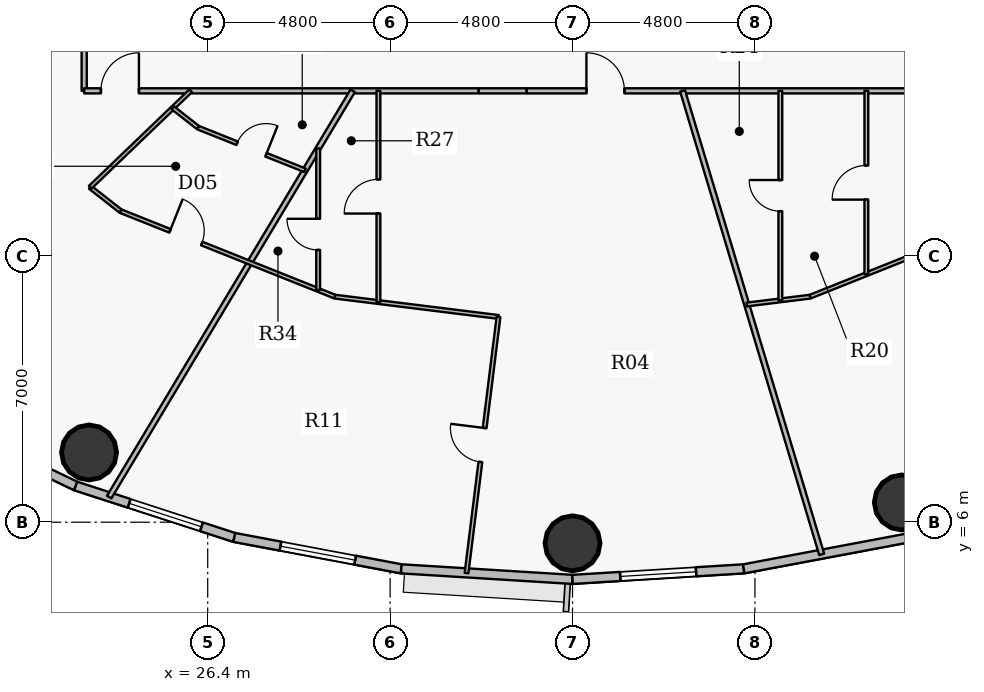
"""IFC4 building model, lengths in metres.
Left out: names, types, materials, properties, quantities, classifications, styles, units other than length and angle.
Written with IfcOpenShell. Run it as: python <this file> out.ifc"""

import sys

from ifc_helpers import new_model, si_unit, direction, frame, frame_2d, origin, origin_2d, place, context, subcontext, project, spatial, rectangle, hollow_circle, extrude, source, transform, mapped, element, fill, save


model = new_model("IFC4")
c1 = context("Model", 3, precision=1e-05, world=origin(), true_north=direction((0.0, 1.0)))
c2 = subcontext(c1, "Body", "Model", "MODEL_VIEW")
j1 = project(units=[si_unit("LENGTHUNIT", "METRE"), si_unit("PLANEANGLEUNIT", "RADIAN")], contexts=[c1])
p1 = place(None, origin())
s1 = spatial("IfcSite", under=j1, at=p1, CompositionType="ELEMENT")
p2 = place(p1, origin())
s2 = spatial("IfcBuilding", under=s1, at=p2, CompositionType="ELEMENT")
p3 = place(p2, frame((0.0, 0.0, 100.95)))
s3 = spatial("IfcBuildingStorey", under=s2, at=p3, CompositionType="ELEMENT", Elevation=100.95)
for number, where, z_axis, x_axis in (
    (1, (23.278, 7.835, 0.0), (0.0, 0.0, 1.0), (1.0, 0.0, 0.0)),
    (2, (36.0, 5.445, 0.0), (0.0, 0.0, 1.0), (1.0, 0.0, 0.0)),
    (3, (44.666, 6.519, 0.0), (0.0, 0.0, 1.0), (1.0, 0.0, 0.0)),
):
    element("IfcColumn", number, at=place(p3, frame(where, z_axis=z_axis, x_axis=x_axis)), inside=s3, PredefinedType="COLUMN", context=c2, shape_type="SweptSolid", body=[
        extrude(hollow_circle(Radius=0.725, WallThickness=0.042, at=origin_2d()), origin(), (0.0, 0.0, 1.0), 3.75),
    ])
p4 = place(p3, frame((22.926, 6.953, 0.0), z_axis=(0.0, 0.0, 1.0), x_axis=(-0.901589935876, 0.432591709962, 0.0)))
e4 = element("IfcWall", 4, at=p4, inside=s3, PredefinedType="SOLIDWALL", context=c2, shape_type="SweptSolid", body=[
    extrude(rectangle(XDim=4.272, YDim=0.24, at=frame_2d((2.136, 0.0))), origin(), (0.0, 0.0, 1.0), 3.5),
])
p5 = place(p4, frame((1.136, 0.0, 0.9)))
e5 = element("IfcOpeningElement", 5, at=p5, cuts=e4, PredefinedType="OPENING", context=c2, shape_type="SweptSolid", body=[
    extrude(rectangle(XDim=2.0, YDim=1.75, at=origin_2d()), frame((1.0, 0.13, 0.875), z_axis=(0.0, -1.0, 0.0), x_axis=(1.0, 0.0, 0.0)), (0.0, 0.0, 1.0), 0.26),
])
p6 = place(p3, frame((27.1, 5.599, 0.0), z_axis=(0.0, 0.0, 1.0), x_axis=(-0.951211346073, 0.308540070495, 0.0)))
e6 = element("IfcWall", 6, at=p6, inside=s3, PredefinedType="SOLIDWALL", context=c2, shape_type="SweptSolid", body=[
    extrude(rectangle(XDim=4.388, YDim=0.24, at=frame_2d((2.194, 0.0))), origin(), (0.0, 0.0, 1.0), 3.5),
])
p7 = place(p6, frame((0.909, 0.0, 0.9)))
e7 = element("IfcOpeningElement", 7, at=p7, cuts=e6, PredefinedType="OPENING", context=c2, shape_type="SweptSolid", body=[
    extrude(rectangle(XDim=2.0, YDim=1.75, at=origin_2d()), frame((1.0, 0.13, 0.875), z_axis=(0.0, -1.0, 0.0), x_axis=(1.0, 0.0, 0.0)), (0.0, 0.0, 1.0), 0.26),
])
p8 = place(p3, frame((31.494, 4.773, 0.0), z_axis=(0.0, 0.0, 1.0), x_axis=(-0.982789252177, 0.184730305596, 0.0)))
e8 = element("IfcWall", 8, at=p8, inside=s3, PredefinedType="SOLIDWALL", context=c2, shape_type="SweptSolid", body=[
    extrude(rectangle(XDim=4.471, YDim=0.24, at=frame_2d((2.235, 0.0))), origin(), (0.0, 0.0, 1.0), 3.5),
])
p9 = place(p8, frame((1.236, 0.0, 0.9)))
e9 = element("IfcOpeningElement", 9, at=p9, cuts=e8, PredefinedType="OPENING", context=c2, shape_type="SweptSolid", body=[
    extrude(rectangle(XDim=2.0, YDim=1.75, at=origin_2d()), frame((1.0, 0.13, 0.875), z_axis=(0.0, -1.0, 0.0), x_axis=(1.0, 0.0, 0.0)), (0.0, 0.0, 1.0), 0.26),
])
p10 = place(p3, frame((36.0, 4.495, 0.0), z_axis=(0.0, 0.0, 1.0), x_axis=(-0.998107531589, 0.061492726276, 0.0)))
e10 = element("IfcWall", 10, at=p10, inside=s3, PredefinedType="SOLIDWALL", context=c2, shape_type="SweptSolid", body=[
    extrude(rectangle(XDim=4.514, YDim=0.24, at=frame_2d((2.257, 0.0))), origin(), (0.0, 0.0, 1.0), 3.5),
])
p11 = place(p3, frame((40.506, 4.773, 0.0), z_axis=(0.0, 0.0, 1.0), x_axis=(-0.998107531589, -0.061492726276, 0.0)))
e11 = element("IfcWall", 11, at=p11, inside=s3, PredefinedType="SOLIDWALL", context=c2, shape_type="SweptSolid", body=[
    extrude(rectangle(XDim=4.514, YDim=0.24, at=frame_2d((2.257, 0.0))), origin(), (0.0, 0.0, 1.0), 3.5),
])
p12 = place(p11, frame((1.257, 0.0, 0.9)))
e12 = element("IfcOpeningElement", 12, at=p12, cuts=e11, PredefinedType="OPENING", context=c2, shape_type="SweptSolid", body=[
    extrude(rectangle(XDim=2.0, YDim=1.75, at=origin_2d()), frame((1.0, 0.13, 0.875), z_axis=(0.0, -1.0, 0.0), x_axis=(1.0, 0.0, 0.0)), (0.0, 0.0, 1.0), 0.26),
])
p13 = place(p3, frame((44.9, 5.599, 0.0), z_axis=(0.0, 0.0, 1.0), x_axis=(-0.982789252177, -0.184730305596, 0.0)))
e13 = element("IfcWall", 13, at=p13, inside=s3, PredefinedType="SOLIDWALL", context=c2, shape_type="SweptSolid", body=[
    extrude(rectangle(XDim=4.471, YDim=0.24, at=frame_2d((2.235, 0.0))), origin(), (0.0, 0.0, 1.0), 3.5),
])
p14 = place(p3, frame((12.427, 14.138, 0.0), z_axis=(0.0, 0.0, 1.0), x_axis=(0.877835987922, 0.47896135367, 0.0)))
e14 = element("IfcWall", 14, at=p14, inside=s3, PredefinedType="PARTITIONING", context=c2, shape_type="SweptSolid", body=[
    extrude(rectangle(XDim=12.215, YDim=0.135, at=frame_2d((6.107, 0.0))), origin(), (0.0, 0.0, 1.0), 2.935),
])
p15 = place(p3, frame((23.15, 17.35, 0.0), z_axis=(0.0, 0.0, 1.0), x_axis=(0.0, 1.0, 0.0)))
e15 = element("IfcWall", 15, at=p15, inside=s3, PredefinedType="PARTITIONING", context=c2, shape_type="SweptSolid", body=[
    extrude(rectangle(XDim=19.3, YDim=0.135, at=frame_2d((9.65, 0.0))), origin(), (0.0, 0.0, 1.0), 2.935),
])
p16 = place(p15, frame((7.86, 0.0, 0.0)))
e16 = element("IfcOpeningElement", 16, at=p16, cuts=e15, PredefinedType="OPENING", context=c2, shape_type="SweptSolid", body=[
    extrude(rectangle(XDim=1.0, YDim=2.15, at=origin_2d()), frame((0.5, 0.078, 1.075), z_axis=(0.0, -1.0, 0.0), x_axis=(1.0, 0.0, 0.0)), (0.0, 0.0, 1.0), 0.155),
])
p17 = place(p3, frame((23.15, 17.35, 0.0), z_axis=(0.0, 0.0, 1.0), x_axis=(1.0, 0.0, 0.0)))
e17 = element("IfcWall", 17, at=p17, inside=s3, PredefinedType="PARTITIONING", context=c2, shape_type="SweptSolid", body=[
    extrude(rectangle(XDim=10.373, YDim=0.135, at=frame_2d((5.187, 0.0))), origin(), (0.0, 0.0, 1.0), 2.935),
])
p18 = place(p17, frame((0.44, 0.0, 0.0)))
e18 = element("IfcOpeningElement", 18, at=p18, cuts=e17, PredefinedType="OPENING", context=c2, shape_type="SweptSolid", body=[
    extrude(rectangle(XDim=1.0, YDim=2.15, at=origin_2d()), frame((0.5, 0.078, 1.075), z_axis=(0.0, -1.0, 0.0), x_axis=(1.0, 0.0, 0.0)), (0.0, 0.0, 1.0), 0.155),
])
p19 = place(p3, frame((23.307, 14.812, 0.0), z_axis=(0.0, 0.0, 1.0), x_axis=(0.787398737985, -0.616444018075, 0.0)))
e19 = element("IfcWall", 19, at=p19, inside=s3, PredefinedType="PARTITIONING", context=c2, shape_type="SweptSolid", body=[
    extrude(rectangle(XDim=1.018, YDim=0.1, at=frame_2d((0.509, 0.0))), origin(), (0.0, 0.0, 1.0), 3.035),
])
p20 = place(p3, frame((23.307, 14.812, 0.0), z_axis=(0.0, 0.0, 1.0), x_axis=(0.721286127108, 0.692637223113, 0.0)))
e20 = element("IfcWall", 20, at=p20, inside=s3, PredefinedType="PARTITIONING", context=c2, shape_type="SweptSolid", body=[
    extrude(rectangle(XDim=3.664, YDim=0.1, at=frame_2d((1.832, 0.0))), origin(), (0.0, 0.0, 1.0), 3.5),
])
p21 = place(p3, frame((23.808, 6.661, 0.0), z_axis=(0.0, 0.0, 1.0), x_axis=(0.51416439954, 0.857691652195, 0.0)))
e21 = element("IfcWall", 21, at=p21, inside=s3, PredefinedType="PARTITIONING", context=c2, shape_type="SweptSolid", body=[
    extrude(rectangle(XDim=12.462, YDim=0.135, at=frame_2d((6.231, 0.0))), origin(), (0.0, 0.0, 1.0), 2.935),
])
p22 = place(p3, frame((24.109, 14.184, 0.0), z_axis=(0.0, 0.0, 1.0), x_axis=(0.9288090756, -0.370558633798, 0.0)))
e22 = element("IfcWall", 22, at=p22, inside=s3, PredefinedType="PARTITIONING", context=c2, shape_type="SweptSolid", body=[
    extrude(rectangle(XDim=6.072, YDim=0.1, at=frame_2d((3.036, 0.0))), origin(), (0.0, 0.0, 1.0), 2.935),
])
p23 = place(p22, frame((1.398, 0.0, 0.0)))
e23 = element("IfcOpeningElement", 23, at=p23, cuts=e22, PredefinedType="OPENING", context=c2, shape_type="SweptSolid", body=[
    extrude(rectangle(XDim=0.9, YDim=2.1, at=origin_2d()), frame((0.45, 0.06, 1.05), z_axis=(0.0, -1.0, 0.0), x_axis=(1.0, 0.0, 0.0)), (0.0, 0.0, 1.0), 0.12),
])
p24 = place(p3, frame((25.483, 16.901, 0.0), z_axis=(0.0, 0.0, 1.0), x_axis=(0.787321722918, -0.616542378609, 0.0)))
e24 = element("IfcWall", 24, at=p24, inside=s3, PredefinedType="PARTITIONING", context=c2, shape_type="SweptSolid", body=[
    extrude(rectangle(XDim=0.844, YDim=0.1, at=frame_2d((0.422, 0.0))), origin(), (0.0, 0.0, 1.0), 3.5),
])
p25 = place(p3, frame((26.147, 16.381, 0.0), z_axis=(0.0, 0.0, 1.0), x_axis=(0.928793125476, -0.370598610451, 0.0)))
e25 = element("IfcWall", 25, at=p25, inside=s3, PredefinedType="PARTITIONING", context=c2, shape_type="SweptSolid", body=[
    extrude(rectangle(XDim=3.03, YDim=0.1, at=frame_2d((1.515, 0.0))), origin(), (0.0, 0.0, 1.0), 2.935),
])
p26 = place(p25, frame((1.105, 0.0, 0.0)))
e26 = element("IfcOpeningElement", 26, at=p26, cuts=e25, PredefinedType="OPENING", context=c2, shape_type="SweptSolid", body=[
    extrude(rectangle(XDim=0.82, YDim=2.1, at=origin_2d()), frame((0.41, 0.06, 1.05), z_axis=(0.0, -1.0, 0.0), x_axis=(1.0, 0.0, 0.0)), (0.0, 0.0, 1.0), 0.12),
])
p27 = place(p3, frame((29.307, 12.111, 0.0), z_axis=(0.0, 0.0, 1.0), x_axis=(0.0, 1.0, 0.0)))
e27 = element("IfcWall", 27, at=p27, inside=s3, PredefinedType="PARTITIONING", context=c2, shape_type="SweptSolid", body=[
    extrude(rectangle(XDim=3.724, YDim=0.1, at=frame_2d((1.862, 0.0))), origin(), (0.0, 0.0, 1.0), 3.5),
])
p28 = place(p27, frame((1.052, 0.0, 0.0)))
e28 = element("IfcOpeningElement", 28, at=p28, cuts=e27, PredefinedType="OPENING", context=c2, shape_type="SweptSolid", body=[
    extrude(rectangle(XDim=0.82, YDim=2.1, at=origin_2d()), frame((0.41, 0.06, 1.05), z_axis=(0.0, -1.0, 0.0), x_axis=(1.0, 0.0, 0.0)), (0.0, 0.0, 1.0), 0.12),
])
p29 = place(p3, frame((29.749, 11.934, 0.0), z_axis=(0.0, 0.0, 1.0), x_axis=(0.992398657051, -0.123064639455, 0.0)))
e29 = element("IfcWall", 29, at=p29, inside=s3, PredefinedType="PARTITIONING", context=c2, shape_type="SweptSolid", body=[
    extrude(rectangle(XDim=4.337, YDim=0.1, at=frame_2d((2.168, 0.0))), origin(), (0.0, 0.0, 1.0), 3.5),
])
p30 = place(p3, frame((30.892, 11.792, 0.0), z_axis=(0.0, 0.0, 1.0), x_axis=(0.0, 1.0, 0.0)))
e30 = element("IfcWall", 30, at=p30, inside=s3, PredefinedType="PARTITIONING", context=c2, shape_type="SweptSolid", body=[
    extrude(rectangle(XDim=5.558, YDim=0.1, at=frame_2d((2.779, 0.0))), origin(), (0.0, 0.0, 1.0), 3.5),
])
p31 = place(p30, frame((2.329, 0.0, 0.0)))
e31 = element("IfcOpeningElement", 31, at=p31, cuts=e30, PredefinedType="OPENING", context=c2, shape_type="SweptSolid", body=[
    extrude(rectangle(XDim=0.9, YDim=2.1, at=origin_2d()), frame((0.45, 0.06, 1.05), z_axis=(0.0, -1.0, 0.0), x_axis=(1.0, 0.0, 0.0)), (0.0, 0.0, 1.0), 0.12),
])
p32 = place(p3, frame((33.211, 4.662, 0.0), z_axis=(0.0, 0.0, 1.0), x_axis=(0.123884295517, 0.992296670016, 0.0)))
e32 = element("IfcWall", 32, at=p32, inside=s3, PredefinedType="PARTITIONING", context=c2, shape_type="SweptSolid", body=[
    extrude(rectangle(XDim=6.791, YDim=0.1, at=frame_2d((3.396, 0.0))), origin(), (0.0, 0.0, 1.0), 2.935),
])
p33 = place(p32, frame((2.946, 0.0, 0.0)))
e33 = element("IfcOpeningElement", 33, at=p33, cuts=e32, PredefinedType="OPENING", context=c2, shape_type="SweptSolid", body=[
    extrude(rectangle(XDim=0.9, YDim=2.1, at=origin_2d()), frame((0.45, 0.06, 1.05), z_axis=(0.0, -1.0, 0.0), x_axis=(1.0, 0.0, 0.0)), (0.0, 0.0, 1.0), 0.12),
])
p34 = place(p3, frame((34.795, 17.35, 0.0), z_axis=(0.0, 0.0, 1.0), x_axis=(1.0, 0.0, 0.0)))
e34 = element("IfcWall", 34, at=p34, inside=s3, PredefinedType="PARTITIONING", context=c2, shape_type="SweptSolid", body=[
    extrude(rectangle(XDim=14.055, YDim=0.135, at=frame_2d((7.028, 0.0))), origin(), (0.0, 0.0, 1.0), 2.935),
])
p35 = place(p34, frame((1.571, 0.0, 0.0)))
e35 = element("IfcOpeningElement", 35, at=p35, cuts=e34, PredefinedType="OPENING", context=c2, shape_type="SweptSolid", body=[
    extrude(rectangle(XDim=1.0, YDim=2.15, at=origin_2d()), frame((0.5, 0.078, 1.075), z_axis=(0.0, -1.0, 0.0), x_axis=(1.0, 0.0, 0.0)), (0.0, 0.0, 1.0), 0.155),
])
p36 = place(p34, frame((10.976, 0.0, 0.0)))
e36 = element("IfcOpeningElement", 36, at=p36, cuts=e34, PredefinedType="OPENING", context=c2, shape_type="SweptSolid", body=[
    extrude(rectangle(XDim=1.0, YDim=2.15, at=origin_2d()), frame((0.5, 0.078, 1.075), z_axis=(0.0, -1.0, 0.0), x_axis=(1.0, 0.0, 0.0)), (0.0, 0.0, 1.0), 0.155),
])
p37 = place(p3, frame((38.896, 17.35, 0.0), z_axis=(0.0, 0.0, 1.0), x_axis=(0.287463970392, -0.957791452105, 0.0)))
e37 = element("IfcWall", 37, at=p37, inside=s3, PredefinedType="PARTITIONING", context=c2, shape_type="SweptSolid", body=[
    extrude(rectangle(XDim=12.734, YDim=0.135, at=frame_2d((6.367, 0.0))), origin(), (0.0, 0.0, 1.0), 2.935),
])
p38 = place(p3, frame((40.584, 11.728, 0.0), z_axis=(0.0, 0.0, 1.0), x_axis=(0.992400317705, 0.123051247123, 0.0)))
e38 = element("IfcWall", 38, at=p38, inside=s3, PredefinedType="PARTITIONING", context=c2, shape_type="SweptSolid", body=[
    extrude(rectangle(XDim=1.68, YDim=0.1, at=frame_2d((0.84, 0.0))), origin(), (0.0, 0.0, 1.0), 2.935),
])
p39 = place(p3, frame((41.469, 11.837, 0.0), z_axis=(0.0, 0.0, 1.0), x_axis=(0.0, 1.0, 0.0)))
e39 = element("IfcWall", 39, at=p39, inside=s3, PredefinedType="PARTITIONING", context=c2, shape_type="SweptSolid", body=[
    extrude(rectangle(XDim=5.513, YDim=0.1, at=frame_2d((2.756, 0.0))), origin(), (0.0, 0.0, 1.0), 2.935),
])
p40 = place(p39, frame((2.346, 0.0, 0.0)))
e40 = element("IfcOpeningElement", 40, at=p40, cuts=e39, PredefinedType="OPENING", context=c2, shape_type="SweptSolid", body=[
    extrude(rectangle(XDim=0.82, YDim=2.1, at=origin_2d()), frame((0.41, 0.06, 1.05), z_axis=(0.0, -1.0, 0.0), x_axis=(1.0, 0.0, 0.0)), (0.0, 0.0, 1.0), 0.12),
])
p41 = place(p3, frame((42.251, 11.934, 0.0), z_axis=(0.0, 0.0, 1.0), x_axis=(0.928805351872, 0.370567967226, 0.0)))
e41 = element("IfcWall", 41, at=p41, inside=s3, PredefinedType="PARTITIONING", context=c2, shape_type="SweptSolid", body=[
    extrude(rectangle(XDim=5.322, YDim=0.1, at=frame_2d((2.661, 0.0))), origin(), (0.0, 0.0, 1.0), 2.935),
])
p42 = place(p3, frame((43.732, 12.525, 0.0), z_axis=(0.0, 0.0, 1.0), x_axis=(0.0, 1.0, 0.0)))
e42 = element("IfcWall", 42, at=p42, inside=s3, PredefinedType="PARTITIONING", context=c2, shape_type="SweptSolid", body=[
    extrude(rectangle(XDim=4.825, YDim=0.1, at=frame_2d((2.413, 0.0))), origin(), (0.0, 0.0, 1.0), 3.5),
])
p43 = place(p42, frame((1.962, 0.0, 0.0)))
e43 = element("IfcOpeningElement", 43, at=p43, cuts=e42, PredefinedType="OPENING", context=c2, shape_type="SweptSolid", body=[
    extrude(rectangle(XDim=0.9, YDim=2.1, at=origin_2d()), frame((0.45, 0.06, 1.05), z_axis=(0.0, -1.0, 0.0), x_axis=(1.0, 0.0, 0.0)), (0.0, 0.0, 1.0), 0.12),
])
p44 = place(p3, frame((34.785, 17.35, 0.0), z_axis=(0.0, 0.0, 1.0), x_axis=(-1.0, 0.0, 0.0)))
e44 = element("IfcWall", 44, at=p44, inside=s3, PredefinedType="PARTITIONING", context=c2, shape_type="SweptSolid", body=[
    extrude(rectangle(XDim=1.252, YDim=0.135, at=frame_2d((0.626, 0.0))), origin(), (0.0, 0.0, 1.0), 3.5),
])
m1 = source(origin(), c2, "Body", "SweptSolid", [
    extrude(rectangle(XDim=2.0, YDim=1.75, at=origin_2d()), frame((1.0, 0.03, 0.875), z_axis=(0.0, -1.0, 0.0), x_axis=(1.0, 0.0, 0.0)), (0.0, 0.0, 1.0), 0.06),
])
p45 = place(p7, origin())
e45 = element("IfcWindow", 45, at=p45, inside=s3, PartitioningType="DOUBLE_PANEL_VERTICAL", PredefinedType="WINDOW", context=c2, shape_type="MappedRepresentation", body=[
    mapped(m1, transform((0.0, 0.0, 0.0), x_axis=(1.0, 0.0, 0.0), y_axis=(0.0, 1.0, 0.0), z_axis=(0.0, 0.0, 1.0), scale=1.0)),
])
fill(e7, e45)
p46 = place(p9, origin())
e46 = element("IfcWindow", 46, at=p46, inside=s3, PartitioningType="DOUBLE_PANEL_VERTICAL", PredefinedType="WINDOW", context=c2, shape_type="MappedRepresentation", body=[
    mapped(m1, transform((0.0, 0.0, 0.0), x_axis=(1.0, 0.0, 0.0), y_axis=(0.0, 1.0, 0.0), z_axis=(0.0, 0.0, 1.0), scale=1.0)),
])
fill(e9, e46)
p47 = place(p12, origin())
e47 = element("IfcWindow", 47, at=p47, inside=s3, PartitioningType="DOUBLE_PANEL_VERTICAL", PredefinedType="WINDOW", context=c2, shape_type="MappedRepresentation", body=[
    mapped(m1, transform((0.0, 0.0, 0.0), x_axis=(1.0, 0.0, 0.0), y_axis=(0.0, 1.0, 0.0), z_axis=(0.0, 0.0, 1.0), scale=1.0)),
])
fill(e12, e47)
m2 = source(origin(), c2, "Body", "SweptSolid", [
    extrude(rectangle(XDim=1.0, YDim=2.15, at=origin_2d()), frame((0.5, 0.025, 1.075), z_axis=(0.0, -1.0, 0.0), x_axis=(1.0, 0.0, 0.0)), (0.0, 0.0, 1.0), 0.05),
])
p48 = place(p18, origin())
e48 = element("IfcDoor", 48, at=p48, inside=s3, OperationType="SINGLE_SWING_RIGHT", PredefinedType="DOOR", context=c2, shape_type="MappedRepresentation", body=[
    mapped(m2, transform((0.0, 0.0, 0.0), x_axis=(1.0, 0.0, 0.0), y_axis=(0.0, 1.0, 0.0), z_axis=(0.0, 0.0, 1.0), scale=1.0)),
])
fill(e18, e48)
m3 = source(origin(), c2, "Body", "SweptSolid", [
    extrude(rectangle(XDim=0.9, YDim=2.1, at=origin_2d()), frame((0.45, 0.025, 1.05), z_axis=(0.0, -1.0, 0.0), x_axis=(1.0, 0.0, 0.0)), (0.0, 0.0, 1.0), 0.05),
])
p49 = place(p23, origin())
e49 = element("IfcDoor", 49, at=p49, inside=s3, OperationType="SINGLE_SWING_LEFT", PredefinedType="DOOR", context=c2, shape_type="MappedRepresentation", body=[
    mapped(m3, transform((0.0, 0.0, 0.0), x_axis=(1.0, 0.0, 0.0), y_axis=(0.0, 1.0, 0.0), z_axis=(0.0, 0.0, 1.0), scale=1.0)),
])
fill(e23, e49)
m4 = source(origin(), c2, "Body", "SweptSolid", [
    extrude(rectangle(XDim=0.82, YDim=2.1, at=origin_2d()), frame((0.41, 0.025, 1.05), z_axis=(0.0, -1.0, 0.0), x_axis=(1.0, 0.0, 0.0)), (0.0, 0.0, 1.0), 0.05),
])
p50 = place(p26, origin())
e50 = element("IfcDoor", 50, at=p50, inside=s3, OperationType="SINGLE_SWING_RIGHT", PredefinedType="DOOR", context=c2, shape_type="MappedRepresentation", body=[
    mapped(m4, transform((0.0, 0.0, 0.0), x_axis=(1.0, 0.0, 0.0), y_axis=(0.0, 1.0, 0.0), z_axis=(0.0, 0.0, 1.0), scale=1.0)),
])
fill(e26, e50)
p51 = place(p35, origin())
e51 = element("IfcDoor", 51, at=p51, inside=s3, OperationType="SINGLE_SWING_LEFT", PredefinedType="DOOR", context=c2, shape_type="MappedRepresentation", body=[
    mapped(m2, transform((0.0, 0.0, 0.0), x_axis=(1.0, 0.0, 0.0), y_axis=(0.0, 1.0, 0.0), z_axis=(0.0, 0.0, 1.0), scale=1.0)),
])
fill(e35, e51)
p52 = place(p33, origin())
e52 = element("IfcDoor", 52, at=p52, inside=s3, OperationType="SINGLE_SWING_RIGHT", PredefinedType="DOOR", context=c2, shape_type="MappedRepresentation", body=[
    mapped(m3, transform((0.0, 0.0, 0.0), x_axis=(1.0, 0.0, 0.0), y_axis=(0.0, 1.0, 0.0), z_axis=(0.0, 0.0, 1.0), scale=1.0)),
])
fill(e33, e52)
p53 = place(p31, origin())
e53 = element("IfcDoor", 53, at=p53, inside=s3, OperationType="SINGLE_SWING_LEFT", PredefinedType="DOOR", context=c2, shape_type="MappedRepresentation", body=[
    mapped(m3, transform((0.0, 0.0, 0.0), x_axis=(1.0, 0.0, 0.0), y_axis=(0.0, 1.0, 0.0), z_axis=(0.0, 0.0, 1.0), scale=1.0)),
])
fill(e31, e53)
p54 = place(p28, origin())
e54 = element("IfcDoor", 54, at=p54, inside=s3, OperationType="SINGLE_SWING_RIGHT", PredefinedType="DOOR", context=c2, shape_type="MappedRepresentation", body=[
    mapped(m4, transform((0.0, 0.0, 0.0), x_axis=(1.0, 0.0, 0.0), y_axis=(0.0, 1.0, 0.0), z_axis=(0.0, 0.0, 1.0), scale=1.0)),
])
fill(e28, e54)
p55 = place(p43, origin())
e55 = element("IfcDoor", 55, at=p55, inside=s3, OperationType="SINGLE_SWING_LEFT", PredefinedType="DOOR", context=c2, shape_type="MappedRepresentation", body=[
    mapped(m3, transform((0.0, 0.0, 0.0), x_axis=(1.0, 0.0, 0.0), y_axis=(0.0, 1.0, 0.0), z_axis=(0.0, 0.0, 1.0), scale=1.0)),
])
fill(e43, e55)
p56 = place(p40, origin())
e56 = element("IfcDoor", 56, at=p56, inside=s3, OperationType="SINGLE_SWING_RIGHT", PredefinedType="DOOR", context=c2, shape_type="MappedRepresentation", body=[
    mapped(m4, transform((0.0, 0.0, 0.0), x_axis=(1.0, 0.0, 0.0), y_axis=(0.0, 1.0, 0.0), z_axis=(0.0, 0.0, 1.0), scale=1.0)),
])
fill(e40, e56)
save(model, sys.argv[1])
